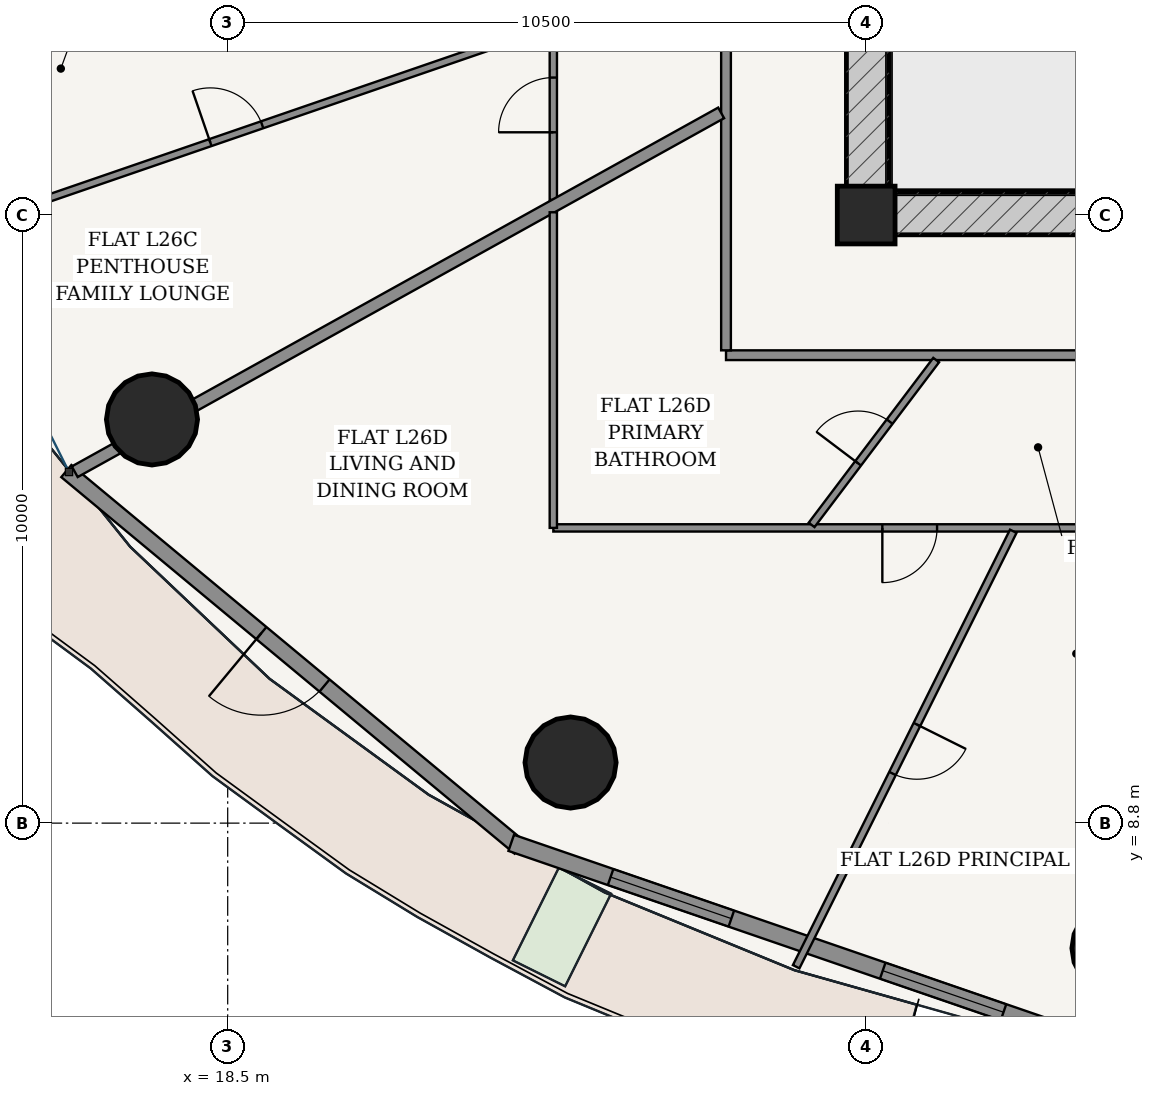
"""IFC4 building model, lengths in metres.
Left out: names, types, materials, properties, quantities, classifications, styles, units other than length and angle.
Written with IfcOpenShell. Run it as: python <this file> out.ifc"""

import sys

from ifc_helpers import new_model, si_unit, direction, frame, frame_2d, origin, origin_2d, place, context, subcontext, project, spatial, rectangle, hollow_circle, extrude, source, transform, mapped, element, fill, save


model = new_model("IFC4")
c1 = context("Model", 3, precision=1e-05, world=origin(), true_north=direction((-0.2419218956, 0.970295726276)))
c2 = subcontext(c1, "Body", "Model", "MODEL_VIEW")
j1 = project(units=[si_unit("LENGTHUNIT", "METRE"), si_unit("PLANEANGLEUNIT", "RADIAN")], contexts=[c1])
p1 = place(None, origin())
s1 = spatial("IfcSite", under=j1, at=p1, CompositionType="ELEMENT")
p2 = place(p1, origin())
s2 = spatial("IfcBuilding", under=s1, at=p2, CompositionType="ELEMENT")
p3 = place(p2, frame((0.0, 0.0, 101.4)))
s3 = spatial("IfcBuildingStorey", under=s2, at=p3, CompositionType="ELEMENT", Elevation=101.4)
p4 = place(p3, frame((29.0, 18.8, 0.0), z_axis=(0.0, 0.0, 1.0), x_axis=(1.0, 0.0, 0.0)))
e1 = element("IfcColumn", 1, at=p4, inside=s3, PredefinedType="COLUMN", context=c2, shape_type="SweptSolid", body=[
    extrude(rectangle(XDim=0.95, YDim=0.95, at=origin_2d()), origin(), (0.0, 0.0, 1.0), 3.6),
])
p5 = place(p3, frame((28.675, 18.825, 0.0), z_axis=(0.0, 0.0, 1.0), x_axis=(1.0, 0.0, 0.0)))
e2 = element("IfcWall", 2, at=p5, inside=s3, PredefinedType="SHEAR", context=c2, shape_type="SweptSolid", body=[
    extrude(rectangle(XDim=18.65, YDim=0.7, at=frame_2d((9.325, 0.0))), origin(), (0.0, 0.0, 1.0), 3.325),
])
p6 = place(p5, frame((6.877, 0.0, 0.0)))
e3 = element("IfcOpeningElement", 3, at=p6, cuts=e2, PredefinedType="OPENING", context=c2, shape_type="SweptSolid", body=[
    extrude(rectangle(XDim=0.85, YDim=2.1, at=frame_2d((0.425, 1.05))), frame((0.0, 0.36, 0.0), z_axis=(0.0, -1.0, 0.0), x_axis=(1.0, 0.0, 0.0)), (0.0, 0.0, 1.0), 0.72),
])
p7 = place(p5, frame((8.9, 0.0, 0.0)))
e4 = element("IfcOpeningElement", 4, at=p7, cuts=e2, PredefinedType="OPENING", context=c2, shape_type="SweptSolid", body=[
    extrude(rectangle(XDim=0.85, YDim=2.1, at=frame_2d((0.425, 1.05))), frame((0.0, 0.36, 0.0), z_axis=(0.0, -1.0, 0.0), x_axis=(1.0, 0.0, 0.0)), (0.0, 0.0, 1.0), 0.72),
])
p8 = place(p5, frame((10.923, 0.0, 0.0)))
e5 = element("IfcOpeningElement", 5, at=p8, cuts=e2, PredefinedType="OPENING", context=c2, shape_type="SweptSolid", body=[
    extrude(rectangle(XDim=0.85, YDim=2.1, at=frame_2d((0.425, 1.05))), frame((0.0, 0.36, 0.0), z_axis=(0.0, -1.0, 0.0), x_axis=(1.0, 0.0, 0.0)), (0.0, 0.0, 1.0), 0.72),
])
p9 = place(p3, frame((29.025, 19.175, 0.0), z_axis=(0.0, 0.0, 1.0), x_axis=(0.0, 1.0, 0.0)))
e6 = element("IfcWall", 6, at=p9, inside=s3, PredefinedType="SHEAR", context=c2, shape_type="SweptSolid", body=[
    extrude(rectangle(XDim=15.25, YDim=0.7, at=frame_2d((7.625, 0.0))), origin(), (0.0, 0.0, 1.0), 3.325),
])
p10 = place(p9, frame((9.875, 0.0, 0.0)))
e7 = element("IfcOpeningElement", 7, at=p10, cuts=e6, PredefinedType="OPENING", context=c2, shape_type="SweptSolid", body=[
    extrude(rectangle(XDim=1.5, YDim=2.2, at=frame_2d((0.75, 1.1))), frame((0.0, 0.36, 0.0), z_axis=(0.0, -1.0, 0.0), x_axis=(1.0, 0.0, 0.0)), (0.0, 0.0, 1.0), 0.72),
])
for number, where, z_axis, x_axis in (
    (8, (17.255, 15.438, 0.0), (0.0, 0.0, 1.0), (1.0, 0.0, 0.0)),
    (9, (24.138, 9.796, 0.0), (0.0, 0.0, 1.0), (1.0, 0.0, 0.0)),
    (10, (33.133, 6.743, 0.0), (0.0, 0.0, 1.0), (1.0, 0.0, 0.0)),
):
    element("IfcColumn", number, at=place(p3, frame(where, z_axis=z_axis, x_axis=x_axis)), inside=s3, PredefinedType="COLUMN", context=c2, shape_type="SweptSolid", body=[
        extrude(hollow_circle(Radius=0.75, WallThickness=0.045, at=origin_2d()), origin(), (0.0, 0.0, 1.0), 3.6),
    ])
p11 = place(p3, frame((15.846, 14.59, 0.0), z_axis=(0.0, 0.0, 1.0), x_axis=(0.769254958887, -0.638941944333, 0.0)))
e11 = element("IfcWall", 11, at=p11, inside=s3, PredefinedType="SOLIDWALL", context=c2, shape_type="SweptSolid", body=[
    extrude(rectangle(XDim=9.69, YDim=0.26, at=frame_2d((4.845, 0.0))), origin(), (0.0, 0.0, 1.0), 3.325),
])
p12 = place(p11, frame((4.17, 0.0, 0.0)))
e12 = element("IfcOpeningElement", 12, at=p12, cuts=e11, PredefinedType="OPENING", context=c2, shape_type="SweptSolid", body=[
    extrude(rectangle(XDim=1.35, YDim=2.2, at=frame_2d((0.675, 1.1))), frame((0.0, 0.14, 0.0), z_axis=(0.0, -1.0, 0.0), x_axis=(1.0, 0.0, 0.0)), (0.0, 0.0, 1.0), 0.28),
])
p13 = place(p3, frame((23.163, 8.476, 0.0), z_axis=(0.0, 0.0, 1.0), x_axis=(0.945590132341, -0.325360264351, 0.0)))
e13 = element("IfcWall", 13, at=p13, inside=s3, PredefinedType="SOLIDWALL", context=c2, shape_type="SweptSolid", body=[
    extrude(rectangle(XDim=10.289, YDim=0.28, at=frame_2d((5.145, 0.0))), origin(), (0.0, 0.0, 1.0), 3.325),
])
p14 = place(p13, frame((1.728, 0.0, 0.85)))
e14 = element("IfcOpeningElement", 14, at=p14, cuts=e13, PredefinedType="OPENING", context=c2, shape_type="SweptSolid", body=[
    extrude(rectangle(XDim=2.1, YDim=1.95, at=frame_2d((1.05, 0.975))), frame((0.0, 0.15, 0.0), z_axis=(0.0, -1.0, 0.0), x_axis=(1.0, 0.0, 0.0)), (0.0, 0.0, 1.0), 0.3),
])
p15 = place(p13, frame((6.461, 0.0, 0.85)))
e15 = element("IfcOpeningElement", 15, at=p15, cuts=e13, PredefinedType="OPENING", context=c2, shape_type="SweptSolid", body=[
    extrude(rectangle(XDim=2.1, YDim=1.95, at=frame_2d((1.05, 0.975))), frame((0.0, 0.15, 0.0), z_axis=(0.0, -1.0, 0.0), x_axis=(1.0, 0.0, 0.0)), (0.0, 0.0, 1.0), 0.3),
])
p16 = place(p3, frame((26.695, 16.495, 0.0), z_axis=(0.0, 0.0, 1.0), x_axis=(1.0, 0.0, 0.0)))
e16 = element("IfcWall", 16, at=p16, inside=s3, PredefinedType="PARTITIONING", context=c2, shape_type="SweptSolid", body=[
    extrude(rectangle(XDim=22.61, YDim=0.16, at=frame_2d((11.305, 0.0))), origin(), (0.0, 0.0, 1.0), 2.767),
])
p17 = place(p16, frame((6.974, 0.0, 0.0)))
e17 = element("IfcOpeningElement", 17, at=p17, cuts=e16, PredefinedType="OPENING", context=c2, shape_type="SweptSolid", body=[
    extrude(rectangle(XDim=0.98, YDim=2.2, at=frame_2d((0.49, 1.1))), frame((0.0, 0.09, 0.0), z_axis=(0.0, -1.0, 0.0), x_axis=(1.0, 0.0, 0.0)), (0.0, 0.0, 1.0), 0.18),
])
p18 = place(p16, frame((18.922, 0.0, 0.0)))
e18 = element("IfcOpeningElement", 18, at=p18, cuts=e16, PredefinedType="OPENING", context=c2, shape_type="SweptSolid", body=[
    extrude(rectangle(XDim=0.98, YDim=2.2, at=frame_2d((0.49, 1.1))), frame((0.0, 0.09, 0.0), z_axis=(0.0, -1.0, 0.0), x_axis=(1.0, 0.0, 0.0)), (0.0, 0.0, 1.0), 0.18),
])
p19 = place(p3, frame((26.695, 16.575, 0.0), z_axis=(0.0, 0.0, 1.0), x_axis=(0.0, 1.0, 0.0)))
e19 = element("IfcWall", 19, at=p19, inside=s3, PredefinedType="PARTITIONING", context=c2, shape_type="SweptSolid", body=[
    extrude(rectangle(XDim=20.45, YDim=0.16, at=frame_2d((10.225, 0.0))), origin(), (0.0, 0.0, 1.0), 2.767),
])
p20 = place(p19, frame((9.547, 0.0, 0.0)))
e20 = element("IfcOpeningElement", 20, at=p20, cuts=e19, PredefinedType="OPENING", context=c2, shape_type="SweptSolid", body=[
    extrude(rectangle(XDim=0.98, YDim=2.2, at=frame_2d((0.49, 1.1))), frame((0.0, 0.09, 0.0), z_axis=(0.0, -1.0, 0.0), x_axis=(1.0, 0.0, 0.0)), (0.0, 0.0, 1.0), 0.18),
])
p21 = place(p3, frame((23.855, 19.05, 0.0), z_axis=(0.0, 0.0, 1.0), x_axis=(0.0, 1.0, 0.0)))
e21 = element("IfcWall", 21, at=p21, inside=s3, PredefinedType="PARTITIONING", context=c2, shape_type="SweptSolid", body=[
    extrude(rectangle(XDim=15.501, YDim=0.12, at=frame_2d((7.75, 0.0))), origin(), (0.0, 0.0, 1.0), 2.767),
])
p22 = place(p21, frame((8.705, 0.0, 0.0)))
e22 = element("IfcOpeningElement", 22, at=p22, cuts=e21, PredefinedType="OPENING", context=c2, shape_type="SweptSolid", body=[
    extrude(rectangle(XDim=0.9, YDim=2.15, at=frame_2d((0.45, 1.075))), frame((0.0, 0.07, 0.0), z_axis=(0.0, -1.0, 0.0), x_axis=(1.0, 0.0, 0.0)), (0.0, 0.0, 1.0), 0.14),
])
p23 = place(p21, frame((1.111, 0.0, 0.0)))
e23 = element("IfcOpeningElement", 23, at=p23, cuts=e21, PredefinedType="OPENING", context=c2, shape_type="SweptSolid", body=[
    extrude(rectangle(XDim=0.9, YDim=2.15, at=frame_2d((0.45, 1.075))), frame((0.0, 0.07, 0.0), z_axis=(0.0, -1.0, 0.0), x_axis=(1.0, 0.0, 0.0)), (0.0, 0.0, 1.0), 0.14),
])
p24 = place(p3, frame((23.796, 21.912, 0.0), z_axis=(0.0, 0.0, 1.0), x_axis=(-0.945574063861, -0.325406960209, 0.0)))
e24 = element("IfcWall", 24, at=p24, inside=s3, PredefinedType="PARTITIONING", context=c2, shape_type="SweptSolid", body=[
    extrude(rectangle(XDim=10.906, YDim=0.12, at=frame_2d((5.453, 0.0))), origin(), (0.0, 0.0, 1.0), 2.767),
])
p25 = place(p24, frame((5.003, 0.0, 0.0)))
e25 = element("IfcOpeningElement", 25, at=p25, cuts=e24, PredefinedType="OPENING", context=c2, shape_type="SweptSolid", body=[
    extrude(rectangle(XDim=0.9, YDim=2.15, at=frame_2d((0.45, 1.075))), frame((0.0, 0.07, 0.0), z_axis=(0.0, -1.0, 0.0), x_axis=(1.0, 0.0, 0.0)), (0.0, 0.0, 1.0), 0.14),
])
p26 = place(p3, frame((26.615, 20.48, 0.0), z_axis=(0.0, 0.0, 1.0), x_axis=(-0.874310671773, -0.48536671623, 0.0)))
e26 = element("IfcWall", 26, at=p26, inside=s3, PredefinedType="PARTITIONING", context=c2, shape_type="SweptSolid", body=[
    extrude(rectangle(XDim=12.159, YDim=0.2, at=frame_2d((6.079, 0.0))), origin(), (0.0, 0.0, 1.0), 2.767),
])
p27 = place(p3, frame((44.451, 13.655, 0.0), z_axis=(0.0, 0.0, 1.0), x_axis=(-1.0, 0.0, 0.0)))
e27 = element("IfcWall", 27, at=p27, inside=s3, PredefinedType="PARTITIONING", context=c2, shape_type="SweptSolid", body=[
    extrude(rectangle(XDim=20.596, YDim=0.12, at=frame_2d((10.298, 0.0))), origin(), (0.0, 0.0, 1.0), 2.767),
])
p28 = place(p27, frame((14.286, 0.0, 0.0)))
e28 = element("IfcOpeningElement", 28, at=p28, cuts=e27, PredefinedType="OPENING", context=c2, shape_type="SweptSolid", body=[
    extrude(rectangle(XDim=0.9, YDim=2.15, at=frame_2d((0.45, 1.075))), frame((0.0, 0.07, 0.0), z_axis=(0.0, -1.0, 0.0), x_axis=(1.0, 0.0, 0.0)), (0.0, 0.0, 1.0), 0.14),
])
p29 = place(p27, frame((2.815, 0.0, 0.0)))
e29 = element("IfcOpeningElement", 29, at=p29, cuts=e27, PredefinedType="OPENING", context=c2, shape_type="SweptSolid", body=[
    extrude(rectangle(XDim=0.9, YDim=2.15, at=frame_2d((0.45, 1.075))), frame((0.0, 0.07, 0.0), z_axis=(0.0, -1.0, 0.0), x_axis=(1.0, 0.0, 0.0)), (0.0, 0.0, 1.0), 0.14),
])
p30 = place(p3, frame((23.855, 13.655, 0.0), z_axis=(0.0, 0.0, 1.0), x_axis=(0.0, 1.0, 0.0)))
e30 = element("IfcWall", 30, at=p30, inside=s3, PredefinedType="PARTITIONING", context=c2, shape_type="SweptSolid", body=[
    extrude(rectangle(XDim=5.19, YDim=0.12, at=frame_2d((2.595, 0.0))), origin(), (0.0, 0.0, 1.0), 3.004),
])
p31 = place(p3, frame((31.419, 13.6, 0.0), z_axis=(0.0, 0.0, 1.0), x_axis=(-0.446188142997, -0.894939182877, 0.0)))
e31 = element("IfcWall", 31, at=p31, inside=s3, PredefinedType="PARTITIONING", context=c2, shape_type="SweptSolid", body=[
    extrude(rectangle(XDim=8.002, YDim=0.12, at=frame_2d((4.001, 0.0))), origin(), (0.0, 0.0, 1.0), 2.767),
])
p32 = place(p31, frame((3.551, 0.0, 0.0)))
e32 = element("IfcOpeningElement", 32, at=p32, cuts=e31, PredefinedType="OPENING", context=c2, shape_type="SweptSolid", body=[
    extrude(rectangle(XDim=0.9, YDim=2.15, at=frame_2d((0.45, 1.075))), frame((0.0, 0.07, 0.0), z_axis=(0.0, -1.0, 0.0), x_axis=(1.0, 0.0, 0.0)), (0.0, 0.0, 1.0), 0.14),
])
p33 = place(p3, frame((30.151, 16.415, 0.0), z_axis=(0.0, 0.0, 1.0), x_axis=(-0.602927617913, -0.79779589342, 0.0)))
e33 = element("IfcWall", 33, at=p33, inside=s3, PredefinedType="PARTITIONING", context=c2, shape_type="SweptSolid", body=[
    extrude(rectangle(XDim=3.398, YDim=0.12, at=frame_2d((1.699, 0.0))), origin(), (0.0, 0.0, 1.0), 3.004),
])
p34 = place(p33, frame((1.269, 0.0, 0.0)))
e34 = element("IfcOpeningElement", 34, at=p34, cuts=e33, PredefinedType="OPENING", context=c2, shape_type="SweptSolid", body=[
    extrude(rectangle(XDim=0.86, YDim=2.15, at=frame_2d((0.43, 1.075))), frame((0.0, 0.07, 0.0), z_axis=(0.0, -1.0, 0.0), x_axis=(1.0, 0.0, 0.0)), (0.0, 0.0, 1.0), 0.14),
])
m1 = source(origin(), c2, "Body", "SweptSolid", [
    extrude(rectangle(XDim=1.35, YDim=2.2, at=frame_2d((0.675, 1.1))), frame((0.0, 0.025, 0.0), z_axis=(0.0, -1.0, 0.0), x_axis=(1.0, 0.0, 0.0)), (0.0, 0.0, 1.0), 0.05),
])
p35 = place(p12, frame((1.35, 0.0, 0.0), z_axis=(0.0, 0.0, 1.0), x_axis=(-1.0, 0.0, 0.0)))
e35 = element("IfcDoor", 35, at=p35, inside=s3, OperationType="SINGLE_SWING_RIGHT", PredefinedType="DOOR", context=c2, shape_type="MappedRepresentation", body=[
    mapped(m1, transform((0.0, 0.0, 0.0), scale=1.0)),
])
fill(e12, e35)
m2 = source(origin(), c2, "Body", "SweptSolid", [
    extrude(rectangle(XDim=2.1, YDim=1.95, at=frame_2d((1.05, 0.975))), frame((0.0, 0.03, 0.0), z_axis=(0.0, -1.0, 0.0), x_axis=(1.0, 0.0, 0.0)), (0.0, 0.0, 1.0), 0.06),
])
p36 = place(p14, origin())
e36 = element("IfcWindow", 36, at=p36, inside=s3, PartitioningType="SINGLE_PANEL", PredefinedType="WINDOW", context=c2, shape_type="MappedRepresentation", body=[
    mapped(m2, transform((0.0, 0.0, 0.0), scale=1.0)),
])
fill(e14, e36)
p37 = place(p15, origin())
e37 = element("IfcWindow", 37, at=p37, inside=s3, PartitioningType="SINGLE_PANEL", PredefinedType="WINDOW", context=c2, shape_type="MappedRepresentation", body=[
    mapped(m2, transform((0.0, 0.0, 0.0), scale=1.0)),
])
fill(e15, e37)
m3 = source(origin(), c2, "Body", "SweptSolid", [
    extrude(rectangle(XDim=0.9, YDim=2.15, at=frame_2d((0.45, 1.075))), frame((0.0, 0.025, 0.0), z_axis=(0.0, -1.0, 0.0), x_axis=(1.0, 0.0, 0.0)), (0.0, 0.0, 1.0), 0.05),
])
p38 = place(p23, origin())
e38 = element("IfcDoor", 38, at=p38, inside=s3, OperationType="SINGLE_SWING_LEFT", PredefinedType="DOOR", context=c2, shape_type="MappedRepresentation", body=[
    mapped(m3, transform((0.0, 0.0, 0.0), scale=1.0)),
])
fill(e23, e38)
p39 = place(p25, frame((0.9, 0.0, 0.0), z_axis=(0.0, 0.0, 1.0), x_axis=(-1.0, 0.0, 0.0)))
e39 = element("IfcDoor", 39, at=p39, inside=s3, OperationType="SINGLE_SWING_LEFT", PredefinedType="DOOR", context=c2, shape_type="MappedRepresentation", body=[
    mapped(m3, transform((0.0, 0.0, 0.0), scale=1.0)),
])
fill(e25, e39)
m4 = source(origin(), c2, "Body", "SweptSolid", [
    extrude(rectangle(XDim=0.86, YDim=2.15, at=frame_2d((0.43, 1.075))), frame((0.0, 0.025, 0.0), z_axis=(0.0, -1.0, 0.0), x_axis=(1.0, 0.0, 0.0)), (0.0, 0.0, 1.0), 0.05),
])
p40 = place(p34, frame((0.86, 0.0, 0.0), z_axis=(0.0, 0.0, 1.0), x_axis=(-1.0, 0.0, 0.0)))
e40 = element("IfcDoor", 40, at=p40, inside=s3, OperationType="SINGLE_SWING_LEFT", PredefinedType="DOOR", context=c2, shape_type="MappedRepresentation", body=[
    mapped(m4, transform((0.0, 0.0, 0.0), scale=1.0)),
])
fill(e34, e40)
p41 = place(p28, origin())
e41 = element("IfcDoor", 41, at=p41, inside=s3, OperationType="SINGLE_SWING_RIGHT", PredefinedType="DOOR", context=c2, shape_type="MappedRepresentation", body=[
    mapped(m3, transform((0.0, 0.0, 0.0), scale=1.0)),
])
fill(e28, e41)
p42 = place(p32, origin())
e42 = element("IfcDoor", 42, at=p42, inside=s3, OperationType="SINGLE_SWING_LEFT", PredefinedType="DOOR", context=c2, shape_type="MappedRepresentation", body=[
    mapped(m3, transform((0.0, 0.0, 0.0), scale=1.0)),
])
fill(e32, e42)
save(model, sys.argv[1])
